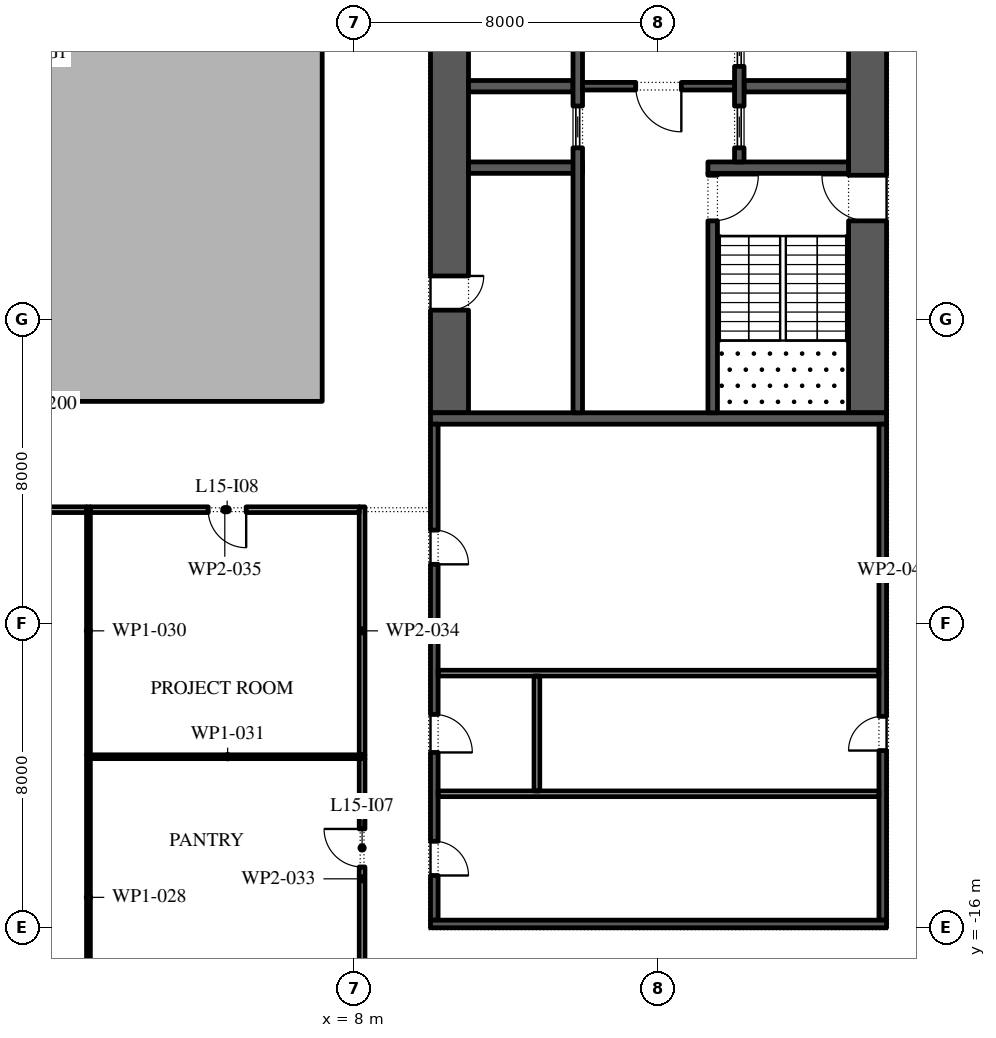
"""IFC4 building model, lengths in metres.
Left out: names, types, materials, properties, quantities, classifications, styles, units other than length and angle.
Written with IfcOpenShell. Run it as: python <this file> out.ifc"""

import sys

from ifc_helpers import new_model, si_unit, direction, frame, frame_2d, origin, place, context, subcontext, project, spatial, polyline, rectangle, outline, extrude, element, fill, save


model = new_model("IFC4")
c1 = context("Model", 3, precision=1e-05, world=origin(), true_north=direction((0.0, 1.0)))
c2 = subcontext(c1, "Body", "Model", "MODEL_VIEW")
j1 = project(units=[si_unit("LENGTHUNIT", "METRE"), si_unit("PLANEANGLEUNIT", "RADIAN")], contexts=[c1])
p1 = place(None, origin())
s1 = spatial("IfcSite", under=j1, at=p1, CompositionType="ELEMENT")
p2 = place(p1, origin())
s2 = spatial("IfcBuilding", under=s1, at=p2, CompositionType="ELEMENT")
p3 = place(p2, frame((0.0, 0.0, 73.2)))
s3 = spatial("IfcBuildingStorey", under=s2, at=p3, CompositionType="ELEMENT", Elevation=73.2)
p4 = place(p3, origin())
e1 = element("IfcWall", 1, at=p4, inside=s3, PredefinedType="STANDARD", context=c2, shape_type="SweptSolid", body=[
    extrude(outline(polyline([(-7.15, -2.15), (7.15, -2.15), (7.15, 16.15), (-7.15, 16.15), (-7.15, -2.15)]), holes=[polyline([(-7.0, -2.0), (-7.0, 16.0), (7.0, 16.0), (7.0, -2.0), (-7.0, -2.0)])]), origin(), (0.0, 0.0, 1.0), 4.0),
])
p5 = place(p3, frame((21.5, -2.45, 0.0), z_axis=(0.0, 0.0, 1.0), x_axis=(0.0, 1.0, 0.0)))
e2 = element("IfcWall", 2, at=p5, inside=s3, PredefinedType="SHEAR", context=c2, shape_type="SweptSolid", body=[
    extrude(rectangle(XDim=27.9, YDim=1.0, at=frame_2d((13.95, 0.0))), origin(), (0.0, 0.0, 1.0), 4.0),
])
p6 = place(p5, frame((5.05, 0.0, 0.0)))
e3 = element("IfcOpeningElement", 3, at=p6, cuts=e2, PredefinedType="OPENING", context=c2, shape_type="SweptSolid", body=[
    extrude(rectangle(XDim=1.2, YDim=2.1, at=frame_2d((0.6, 1.05))), frame((0.0, 0.51, 0.0), z_axis=(0.0, -1.0, 0.0), x_axis=(1.0, 0.0, 0.0)), (0.0, 0.0, 1.0), 1.02),
])
p7 = place(p5, frame((21.65, 0.0, 0.0)))
e4 = element("IfcOpeningElement", 4, at=p7, cuts=e2, PredefinedType="OPENING", context=c2, shape_type="SweptSolid", body=[
    extrude(rectangle(XDim=1.2, YDim=2.1, at=frame_2d((0.6, 1.05))), frame((0.0, 0.51, 0.0), z_axis=(0.0, -1.0, 0.0), x_axis=(1.0, 0.0, 0.0)), (0.0, 0.0, 1.0), 1.02),
])
p8 = place(p3, frame((10.5, -2.45, 0.0), z_axis=(0.0, 0.0, 1.0), x_axis=(0.0, 1.0, 0.0)))
e5 = element("IfcWall", 5, at=p8, inside=s3, PredefinedType="SHEAR", context=c2, shape_type="SweptSolid", body=[
    extrude(rectangle(XDim=27.9, YDim=1.0, at=frame_2d((13.95, 0.0))), origin(), (0.0, 0.0, 1.0), 4.0),
])
p9 = place(p8, frame((23.65, 0.0, 0.0)))
e6 = element("IfcOpeningElement", 6, at=p9, cuts=e5, PredefinedType="OPENING", context=c2, shape_type="SweptSolid", body=[
    extrude(rectangle(XDim=2.4, YDim=2.1, at=frame_2d((1.2, 1.05))), frame((0.0, 0.51, 0.0), z_axis=(0.0, -1.0, 0.0), x_axis=(1.0, 0.0, 0.0)), (0.0, 0.0, 1.0), 1.02),
])
p10 = place(p8, frame((2.7, 0.0, 0.0)))
e7 = element("IfcOpeningElement", 7, at=p10, cuts=e5, PredefinedType="OPENING", context=c2, shape_type="SweptSolid", body=[
    extrude(rectangle(XDim=0.9, YDim=2.1, at=frame_2d((0.45, 1.05))), frame((0.0, 0.51, 0.0), z_axis=(0.0, -1.0, 0.0), x_axis=(1.0, 0.0, 0.0)), (0.0, 0.0, 1.0), 1.02),
])
p11 = place(p3, frame((10.0, -2.6, 0.0), z_axis=(0.0, 0.0, 1.0), x_axis=(1.0, 0.0, 0.0)))
e8 = element("IfcWall", 8, at=p11, inside=s3, PredefinedType="SHEAR", context=c2, shape_type="SweptSolid", body=[
    extrude(rectangle(XDim=12.0, YDim=0.3, at=frame_2d((6.0, 0.0))), origin(), (0.0, 0.0, 1.0), 4.0),
])
p12 = place(p3, frame((17.3, 4.0, 0.0), z_axis=(0.0, 0.0, 1.0), x_axis=(1.0, 0.0, 0.0)))
e9 = element("IfcWall", 9, at=p12, inside=s3, PredefinedType="SHEAR", context=c2, shape_type="SweptSolid", body=[
    extrude(rectangle(XDim=3.7, YDim=0.3, at=frame_2d((1.85, 0.0))), origin(), (0.0, 0.0, 1.0), 4.0),
])
p13 = place(p3, frame((17.425, -2.45, 0.0), z_axis=(0.0, 0.0, 1.0), x_axis=(0.0, 1.0, 0.0)))
e10 = element("IfcWall", 10, at=p13, inside=s3, PredefinedType="SHEAR", context=c2, shape_type="SweptSolid", body=[
    extrude(rectangle(XDim=6.3, YDim=0.25, at=frame_2d((3.15, 0.0))), origin(), (0.0, 0.0, 1.0), 4.0),
])
p14 = place(p13, frame((5.05, 0.0, 0.0)))
e11 = element("IfcOpeningElement", 11, at=p14, cuts=e10, PredefinedType="OPENING", context=c2, shape_type="SweptSolid", body=[
    extrude(rectangle(XDim=1.2, YDim=2.1, at=frame_2d((0.6, 1.05))), frame((0.0, 0.135, 0.0), z_axis=(0.0, -1.0, 0.0), x_axis=(1.0, 0.0, 0.0)), (0.0, 0.0, 1.0), 0.27),
])
p15 = place(p3, frame((18.25, 6.143, 0.0), z_axis=(0.0, 0.0, 1.0), x_axis=(1.0, 0.0, 0.0)))
e12 = element("IfcWall", 12, at=p15, inside=s3, PredefinedType="SHEAR", context=c2, shape_type="SweptSolid", body=[
    extrude(rectangle(XDim=2.75, YDim=0.3, at=frame_2d((1.375, 0.0))), origin(), (0.0, 0.0, 1.0), 4.0),
])
p16 = place(p3, frame((18.125, 4.15, 0.0), z_axis=(0.0, 0.0, 1.0), x_axis=(0.0, 1.0, 0.0)))
e13 = element("IfcWall", 13, at=p16, inside=s3, PredefinedType="SHEAR", context=c2, shape_type="SweptSolid", body=[
    extrude(rectangle(XDim=14.7, YDim=0.25, at=frame_2d((7.35, 0.0))), origin(), (0.0, 0.0, 1.0), 4.0),
])
p17 = place(p16, frame((0.371, 0.0, 0.0)))
e14 = element("IfcOpeningElement", 14, at=p17, cuts=e13, PredefinedType="OPENING", context=c2, shape_type="SweptSolid", body=[
    extrude(rectangle(XDim=1.1, YDim=2.1, at=frame_2d((0.55, 1.05))), frame((0.0, 0.135, 0.0), z_axis=(0.0, -1.0, 0.0), x_axis=(1.0, 0.0, 0.0)), (0.0, 0.0, 1.0), 0.27),
])
p18 = place(p16, frame((2.514, 0.0, 0.0)))
e15 = element("IfcOpeningElement", 15, at=p18, cuts=e13, PredefinedType="OPENING", context=c2, shape_type="SweptSolid", body=[
    extrude(rectangle(XDim=1.1, YDim=2.1, at=frame_2d((0.55, 1.05))), frame((0.0, 0.135, 0.0), z_axis=(0.0, -1.0, 0.0), x_axis=(1.0, 0.0, 0.0)), (0.0, 0.0, 1.0), 0.27),
])
p19 = place(p16, frame((4.657, 0.0, 0.0)))
e16 = element("IfcOpeningElement", 16, at=p19, cuts=e13, PredefinedType="OPENING", context=c2, shape_type="SweptSolid", body=[
    extrude(rectangle(XDim=1.1, YDim=2.1, at=frame_2d((0.55, 1.05))), frame((0.0, 0.135, 0.0), z_axis=(0.0, -1.0, 0.0), x_axis=(1.0, 0.0, 0.0)), (0.0, 0.0, 1.0), 0.27),
])
p20 = place(p16, frame((6.8, 0.0, 0.0)))
e17 = element("IfcOpeningElement", 17, at=p20, cuts=e13, PredefinedType="OPENING", context=c2, shape_type="SweptSolid", body=[
    extrude(rectangle(XDim=1.1, YDim=2.1, at=frame_2d((0.55, 1.05))), frame((0.0, 0.135, 0.0), z_axis=(0.0, -1.0, 0.0), x_axis=(1.0, 0.0, 0.0)), (0.0, 0.0, 1.0), 0.27),
])
p21 = place(p16, frame((8.943, 0.0, 0.0)))
e18 = element("IfcOpeningElement", 18, at=p21, cuts=e13, PredefinedType="OPENING", context=c2, shape_type="SweptSolid", body=[
    extrude(rectangle(XDim=1.1, YDim=2.1, at=frame_2d((0.55, 1.05))), frame((0.0, 0.135, 0.0), z_axis=(0.0, -1.0, 0.0), x_axis=(1.0, 0.0, 0.0)), (0.0, 0.0, 1.0), 0.27),
])
p22 = place(p16, frame((11.086, 0.0, 0.0)))
e19 = element("IfcOpeningElement", 19, at=p22, cuts=e13, PredefinedType="OPENING", context=c2, shape_type="SweptSolid", body=[
    extrude(rectangle(XDim=1.1, YDim=2.1, at=frame_2d((0.55, 1.05))), frame((0.0, 0.135, 0.0), z_axis=(0.0, -1.0, 0.0), x_axis=(1.0, 0.0, 0.0)), (0.0, 0.0, 1.0), 0.27),
])
p23 = place(p16, frame((13.229, 0.0, 0.0)))
e20 = element("IfcOpeningElement", 20, at=p23, cuts=e13, PredefinedType="OPENING", context=c2, shape_type="SweptSolid", body=[
    extrude(rectangle(XDim=1.1, YDim=2.1, at=frame_2d((0.55, 1.05))), frame((0.0, 0.135, 0.0), z_axis=(0.0, -1.0, 0.0), x_axis=(1.0, 0.0, 0.0)), (0.0, 0.0, 1.0), 0.27),
])
p24 = place(p3, frame((11.0, 4.0, 0.0), z_axis=(0.0, 0.0, 1.0), x_axis=(1.0, 0.0, 0.0)))
e21 = element("IfcWall", 21, at=p24, inside=s3, PredefinedType="SHEAR", context=c2, shape_type="SweptSolid", body=[
    extrude(rectangle(XDim=3.0, YDim=0.3, at=frame_2d((1.5, 0.0))), origin(), (0.0, 0.0, 1.0), 4.0),
])
p25 = place(p3, frame((11.0, 6.143, 0.0), z_axis=(0.0, 0.0, 1.0), x_axis=(1.0, 0.0, 0.0)))
e22 = element("IfcWall", 22, at=p25, inside=s3, PredefinedType="SHEAR", context=c2, shape_type="SweptSolid", body=[
    extrude(rectangle(XDim=2.75, YDim=0.3, at=frame_2d((1.375, 0.0))), origin(), (0.0, 0.0, 1.0), 4.0),
])
p26 = place(p3, frame((13.875, -2.45, 0.0), z_axis=(0.0, 0.0, 1.0), x_axis=(0.0, 1.0, 0.0)))
e23 = element("IfcWall", 23, at=p26, inside=s3, PredefinedType="SHEAR", context=c2, shape_type="SweptSolid", body=[
    extrude(rectangle(XDim=21.3, YDim=0.25, at=frame_2d((10.65, 0.0))), origin(), (0.0, 0.0, 1.0), 4.0),
])
p27 = place(p26, frame((10.196, 0.0, 0.0)))
e24 = element("IfcOpeningElement", 24, at=p27, cuts=e23, PredefinedType="OPENING", context=c2, shape_type="SweptSolid", body=[
    extrude(rectangle(XDim=0.9, YDim=2.1, at=frame_2d((0.45, 1.05))), frame((0.0, 0.135, 0.0), z_axis=(0.0, -1.0, 0.0), x_axis=(1.0, 0.0, 0.0)), (0.0, 0.0, 1.0), 0.27),
])
p28 = place(p26, frame((16.475, 0.0, 0.0)))
e25 = element("IfcOpeningElement", 25, at=p28, cuts=e23, PredefinedType="OPENING", context=c2, shape_type="SweptSolid", body=[
    extrude(rectangle(XDim=0.9, YDim=2.1, at=frame_2d((0.45, 1.05))), frame((0.0, 0.135, 0.0), z_axis=(0.0, -1.0, 0.0), x_axis=(1.0, 0.0, 0.0)), (0.0, 0.0, 1.0), 0.27),
])
p29 = place(p26, frame((6.971, 0.0, 0.0)))
e26 = element("IfcOpeningElement", 26, at=p29, cuts=e23, PredefinedType="OPENING", context=c2, shape_type="SweptSolid", body=[
    extrude(rectangle(XDim=1.1, YDim=2.1, at=frame_2d((0.55, 1.05))), frame((0.0, 0.135, 0.0), z_axis=(0.0, -1.0, 0.0), x_axis=(1.0, 0.0, 0.0)), (0.0, 0.0, 1.0), 0.27),
])
p30 = place(p3, frame((14.0, 6.143, 0.0), z_axis=(0.0, 0.0, 1.0), x_axis=(1.0, 0.0, 0.0)))
e27 = element("IfcWall", 27, at=p30, inside=s3, PredefinedType="SHEAR", context=c2, shape_type="SweptSolid", body=[
    extrude(rectangle(XDim=4.0, YDim=0.2, at=frame_2d((2.0, 0.0))), origin(), (0.0, 0.0, 1.0), 4.0),
])
p31 = place(p30, frame((1.4, 0.0, 0.0)))
e28 = element("IfcOpeningElement", 28, at=p31, cuts=e27, PredefinedType="OPENING", context=c2, shape_type="SweptSolid", body=[
    extrude(rectangle(XDim=1.2, YDim=2.1, at=frame_2d((0.6, 1.05))), frame((0.0, 0.11, 0.0), z_axis=(0.0, -1.0, 0.0), x_axis=(1.0, 0.0, 0.0)), (0.0, 0.0, 1.0), 0.22),
])
p32 = place(p3, frame((21.9, -15.8, 0.0), z_axis=(0.0, 0.0, 1.0), x_axis=(0.0, 1.0, 0.0)))
e29 = element("IfcWall", 29, at=p32, inside=s3, PredefinedType="SHEAR", context=c2, shape_type="SweptSolid", body=[
    extrude(rectangle(XDim=13.05, YDim=0.2, at=frame_2d((6.525, 0.0))), origin(), (0.0, 0.0, 1.0), 4.0),
])
p33 = place(p32, frame((4.462, 0.0, 0.0)))
e30 = element("IfcOpeningElement", 30, at=p33, cuts=e29, PredefinedType="OPENING", context=c2, shape_type="SweptSolid", body=[
    extrude(rectangle(XDim=0.9, YDim=2.1, at=frame_2d((0.45, 1.05))), frame((0.0, 0.11, 0.0), z_axis=(0.0, -1.0, 0.0), x_axis=(1.0, 0.0, 0.0)), (0.0, 0.0, 1.0), 0.22),
])
p34 = place(p3, frame((10.1, -15.8, 0.0), z_axis=(0.0, 0.0, 1.0), x_axis=(0.0, 1.0, 0.0)))
e31 = element("IfcWall", 31, at=p34, inside=s3, PredefinedType="SHEAR", context=c2, shape_type="SweptSolid", body=[
    extrude(rectangle(XDim=13.05, YDim=0.2, at=frame_2d((6.525, 0.0))), origin(), (0.0, 0.0, 1.0), 4.0),
])
p35 = place(p34, frame((1.175, 0.0, 0.0)))
e32 = element("IfcOpeningElement", 32, at=p35, cuts=e31, PredefinedType="OPENING", context=c2, shape_type="SweptSolid", body=[
    extrude(rectangle(XDim=0.9, YDim=2.1, at=frame_2d((0.45, 1.05))), frame((0.0, 0.11, 0.0), z_axis=(0.0, -1.0, 0.0), x_axis=(1.0, 0.0, 0.0)), (0.0, 0.0, 1.0), 0.22),
])
p36 = place(p34, frame((4.413, 0.0, 0.0)))
e33 = element("IfcOpeningElement", 33, at=p36, cuts=e31, PredefinedType="OPENING", context=c2, shape_type="SweptSolid", body=[
    extrude(rectangle(XDim=1.0, YDim=2.1, at=frame_2d((0.5, 1.05))), frame((0.0, 0.11, 0.0), z_axis=(0.0, -1.0, 0.0), x_axis=(1.0, 0.0, 0.0)), (0.0, 0.0, 1.0), 0.22),
])
p37 = place(p34, frame((9.363, 0.0, 0.0)))
e34 = element("IfcOpeningElement", 34, at=p37, cuts=e31, PredefinedType="OPENING", context=c2, shape_type="SweptSolid", body=[
    extrude(rectangle(XDim=0.9, YDim=2.1, at=frame_2d((0.45, 1.05))), frame((0.0, 0.11, 0.0), z_axis=(0.0, -1.0, 0.0), x_axis=(1.0, 0.0, 0.0)), (0.0, 0.0, 1.0), 0.22),
])
p38 = place(p3, frame((10.0, -15.9, 0.0), z_axis=(0.0, 0.0, 1.0), x_axis=(1.0, 0.0, 0.0)))
e35 = element("IfcWall", 35, at=p38, inside=s3, PredefinedType="SHEAR", context=c2, shape_type="SweptSolid", body=[
    extrude(rectangle(XDim=12.0, YDim=0.2, at=frame_2d((6.0, 0.0))), origin(), (0.0, 0.0, 1.0), 4.0),
])
for number, where, z_axis, x_axis in (
    (36, (10.2, -9.3, 0.0), (0.0, 0.0, 1.0), (1.0, 0.0, 0.0)),
    (37, (10.2, -12.475, 0.0), (0.0, 0.0, 1.0), (1.0, 0.0, 0.0)),
):
    element("IfcWall", number, at=place(p3, frame(where, z_axis=z_axis, x_axis=x_axis)), inside=s3, PredefinedType="PARTITIONING", context=c2, shape_type="SweptSolid", body=[
        extrude(rectangle(XDim=11.6, YDim=0.15, at=frame_2d((5.8, 0.0))), origin(), (0.0, 0.0, 1.0), 4.0),
    ])
p39 = place(p3, frame((12.8, -12.4, 0.0), z_axis=(0.0, 0.0, 1.0), x_axis=(0.0, 1.0, 0.0)))
e38 = element("IfcWall", 38, at=p39, inside=s3, PredefinedType="PARTITIONING", context=c2, shape_type="SweptSolid", body=[
    extrude(rectangle(XDim=3.025, YDim=0.15, at=frame_2d((1.512, 0.0))), origin(), (0.0, 0.0, 1.0), 4.0),
])
p40 = place(p3, frame((1.0, -18.95, 0.0), z_axis=(0.0, 0.0, 1.0), x_axis=(0.0, 1.0, 0.0)))
e39 = element("IfcWall", 39, at=p40, inside=s3, PredefinedType="PARTITIONING", context=c2, shape_type="SweptSolid", body=[
    extrude(rectangle(XDim=7.5, YDim=0.1, at=frame_2d((3.75, 0.0))), origin(), (0.0, 0.0, 1.0), 4.0),
])
p41 = place(p3, frame((1.0, -11.45, 0.0), z_axis=(0.0, 0.0, 1.0), x_axis=(0.0, 1.0, 0.0)))
e40 = element("IfcWall", 40, at=p41, inside=s3, PredefinedType="PARTITIONING", context=c2, shape_type="SweptSolid", body=[
    extrude(rectangle(XDim=6.525, YDim=0.1, at=frame_2d((3.262, 0.0))), origin(), (0.0, 0.0, 1.0), 4.0),
])
p42 = place(p3, frame((1.05, -11.5, 0.0), z_axis=(0.0, 0.0, 1.0), x_axis=(1.0, 0.0, 0.0)))
e41 = element("IfcWall", 41, at=p42, inside=s3, PredefinedType="PARTITIONING", context=c2, shape_type="SweptSolid", body=[
    extrude(rectangle(XDim=7.225, YDim=0.1, at=frame_2d((3.612, 0.0))), origin(), (0.0, 0.0, 1.0), 4.0),
])
p43 = place(p3, frame((0.95, -5.0, 0.0), z_axis=(0.0, 0.0, 1.0), x_axis=(-1.0, 0.0, 0.0)))
e42 = element("IfcWall", 42, at=p43, inside=s3, PredefinedType="PARTITIONING", context=c2, shape_type="SweptSolid", body=[
    extrude(rectangle(XDim=9.075, YDim=0.15, at=frame_2d((4.538, 0.0))), origin(), (0.0, 0.0, 1.0), 4.0),
])
p44 = place(p3, frame((8.2, -17.875, 0.0), z_axis=(0.0, 0.0, 1.0), x_axis=(0.0, 1.0, 0.0)))
e43 = element("IfcWall", 43, at=p44, inside=s3, PredefinedType="PARTITIONING", context=c2, shape_type="SweptSolid", body=[
    extrude(rectangle(XDim=6.325, YDim=0.15, at=frame_2d((3.163, 0.0))), origin(), (0.0, 0.0, 1.0), 4.0),
])
p45 = place(p44, frame((3.475, 0.0, 0.0)))
e44 = element("IfcOpeningElement", 44, at=p45, cuts=e43, PredefinedType="OPENING", context=c2, shape_type="SweptSolid", body=[
    extrude(rectangle(XDim=1.0, YDim=2.1, at=frame_2d((0.5, 1.05))), frame((0.0, 0.085, 0.0), z_axis=(0.0, -1.0, 0.0), x_axis=(1.0, 0.0, 0.0)), (0.0, 0.0, 1.0), 0.17),
])
p46 = place(p3, frame((8.2, -11.45, 0.0), z_axis=(0.0, 0.0, 1.0), x_axis=(0.0, 1.0, 0.0)))
e45 = element("IfcWall", 45, at=p46, inside=s3, PredefinedType="PARTITIONING", context=c2, shape_type="SweptSolid", body=[
    extrude(rectangle(XDim=6.525, YDim=0.15, at=frame_2d((3.262, 0.0))), origin(), (0.0, 0.0, 1.0), 4.0),
])
p47 = place(p3, frame((8.125, -5.0, 0.0), z_axis=(0.0, 0.0, 1.0), x_axis=(-1.0, 0.0, 0.0)))
e46 = element("IfcWall", 46, at=p47, inside=s3, PredefinedType="PARTITIONING", context=c2, shape_type="SweptSolid", body=[
    extrude(rectangle(XDim=7.075, YDim=0.15, at=frame_2d((3.538, 0.0))), origin(), (0.0, 0.0, 1.0), 4.0),
])
p48 = place(p47, frame((2.975, 0.0, 0.0)))
e47 = element("IfcOpeningElement", 47, at=p48, cuts=e46, PredefinedType="OPENING", context=c2, shape_type="SweptSolid", body=[
    extrude(rectangle(XDim=1.0, YDim=2.1, at=frame_2d((0.5, 1.05))), frame((0.0, 0.085, 0.0), z_axis=(0.0, -1.0, 0.0), x_axis=(1.0, 0.0, 0.0)), (0.0, 0.0, 1.0), 0.17),
])
p49 = place(p17, origin())
e48 = element("IfcDoor", 48, at=p49, inside=s3, OperationType="SLIDING_TO_LEFT", PredefinedType="DOOR", context=c2, shape_type="SweptSolid", body=[
    extrude(rectangle(XDim=1.1, YDim=2.1, at=frame_2d((0.55, 1.05))), frame((0.0, 0.025, 0.0), z_axis=(0.0, -1.0, 0.0), x_axis=(1.0, 0.0, 0.0)), (0.0, 0.0, 1.0), 0.05),
])
fill(e14, e48)
p50 = place(p18, origin())
e49 = element("IfcDoor", 49, at=p50, inside=s3, OperationType="SLIDING_TO_LEFT", PredefinedType="DOOR", context=c2, shape_type="SweptSolid", body=[
    extrude(rectangle(XDim=1.1, YDim=2.1, at=frame_2d((0.55, 1.05))), frame((0.0, 0.025, 0.0), z_axis=(0.0, -1.0, 0.0), x_axis=(1.0, 0.0, 0.0)), (0.0, 0.0, 1.0), 0.05),
])
fill(e15, e49)
p51 = place(p29, origin())
e50 = element("IfcDoor", 50, at=p51, inside=s3, OperationType="SLIDING_TO_LEFT", PredefinedType="DOOR", context=c2, shape_type="SweptSolid", body=[
    extrude(rectangle(XDim=1.1, YDim=2.1, at=frame_2d((0.55, 1.05))), frame((0.0, 0.025, 0.0), z_axis=(0.0, -1.0, 0.0), x_axis=(1.0, 0.0, 0.0)), (0.0, 0.0, 1.0), 0.05),
])
fill(e26, e50)
p52 = place(p31, frame((1.2, 0.0, 0.0), z_axis=(0.0, 0.0, 1.0), x_axis=(-1.0, 0.0, 0.0)))
e51 = element("IfcDoor", 51, at=p52, inside=s3, OperationType="SINGLE_SWING_RIGHT", PredefinedType="DOOR", context=c2, shape_type="SweptSolid", body=[
    extrude(rectangle(XDim=1.2, YDim=2.1, at=frame_2d((0.6, 1.05))), frame((0.0, 0.025, 0.0), z_axis=(0.0, -1.0, 0.0), x_axis=(1.0, 0.0, 0.0)), (0.0, 0.0, 1.0), 0.05),
])
fill(e28, e51)
p53 = place(p14, frame((1.2, 0.0, 0.0), z_axis=(0.0, 0.0, 1.0), x_axis=(-1.0, 0.0, 0.0)))
e52 = element("IfcDoor", 52, at=p53, inside=s3, OperationType="SINGLE_SWING_RIGHT", PredefinedType="DOOR", context=c2, shape_type="SweptSolid", body=[
    extrude(rectangle(XDim=1.2, YDim=2.1, at=frame_2d((0.6, 1.05))), frame((0.0, 0.025, 0.0), z_axis=(0.0, -1.0, 0.0), x_axis=(1.0, 0.0, 0.0)), (0.0, 0.0, 1.0), 0.05),
])
fill(e11, e52)
p54 = place(p6, origin())
e53 = element("IfcDoor", 53, at=p54, inside=s3, OperationType="SINGLE_SWING_LEFT", PredefinedType="DOOR", context=c2, shape_type="SweptSolid", body=[
    extrude(rectangle(XDim=1.2, YDim=2.1, at=frame_2d((0.6, 1.05))), frame((0.0, 0.025, 0.0), z_axis=(0.0, -1.0, 0.0), x_axis=(1.0, 0.0, 0.0)), (0.0, 0.0, 1.0), 0.05),
])
fill(e3, e53)
p55 = place(p10, frame((0.9, -0.95, 0.0), z_axis=(0.0, 0.0, 1.0), x_axis=(-1.0, 0.0, 0.0)))
e54 = element("IfcDoor", 54, at=p55, inside=s3, OperationType="SINGLE_SWING_RIGHT", PredefinedType="DOOR", context=c2, shape_type="SweptSolid", body=[
    extrude(rectangle(XDim=0.9, YDim=2.1, at=frame_2d((0.45, 1.05))), frame((0.0, -0.45, 0.0), z_axis=(0.0, -1.0, 0.0), x_axis=(1.0, 0.0, 0.0)), (0.0, 0.0, 1.0), 0.05),
])
fill(e7, e54)
p56 = place(p35, frame((0.9, -0.15, 0.0), z_axis=(0.0, 0.0, 1.0), x_axis=(-1.0, 0.0, 0.0)))
e55 = element("IfcDoor", 55, at=p56, inside=s3, OperationType="SINGLE_SWING_LEFT", PredefinedType="DOOR", context=c2, shape_type="SweptSolid", body=[
    extrude(rectangle(XDim=0.9, YDim=2.1, at=frame_2d((0.45, 1.05))), frame((0.0, -0.05, 0.0), z_axis=(0.0, -1.0, 0.0), x_axis=(1.0, 0.0, 0.0)), (0.0, 0.0, 1.0), 0.05),
])
fill(e32, e55)
p57 = place(p36, frame((1.0, -0.15, 0.0), z_axis=(0.0, 0.0, 1.0), x_axis=(-1.0, 0.0, 0.0)))
e56 = element("IfcDoor", 56, at=p57, inside=s3, OperationType="SINGLE_SWING_LEFT", PredefinedType="DOOR", context=c2, shape_type="SweptSolid", body=[
    extrude(rectangle(XDim=1.0, YDim=2.1, at=frame_2d((0.5, 1.05))), frame((0.0, -0.05, 0.0), z_axis=(0.0, -1.0, 0.0), x_axis=(1.0, 0.0, 0.0)), (0.0, 0.0, 1.0), 0.05),
])
fill(e33, e56)
p58 = place(p33, origin())
e57 = element("IfcDoor", 57, at=p58, inside=s3, OperationType="SINGLE_SWING_RIGHT", PredefinedType="DOOR", context=c2, shape_type="SweptSolid", body=[
    extrude(rectangle(XDim=0.9, YDim=2.1, at=frame_2d((0.45, 1.05))), frame((0.0, 0.1, 0.0), z_axis=(0.0, -1.0, 0.0), x_axis=(1.0, 0.0, 0.0)), (0.0, 0.0, 1.0), 0.05),
])
fill(e30, e57)
p59 = place(p37, frame((0.9, -0.15, 0.0), z_axis=(0.0, 0.0, 1.0), x_axis=(-1.0, 0.0, 0.0)))
e58 = element("IfcDoor", 58, at=p59, inside=s3, OperationType="SINGLE_SWING_LEFT", PredefinedType="DOOR", context=c2, shape_type="SweptSolid", body=[
    extrude(rectangle(XDim=0.9, YDim=2.1, at=frame_2d((0.45, 1.05))), frame((0.0, -0.05, 0.0), z_axis=(0.0, -1.0, 0.0), x_axis=(1.0, 0.0, 0.0)), (0.0, 0.0, 1.0), 0.05),
])
fill(e34, e58)
p60 = place(p45, origin())
e59 = element("IfcDoor", 59, at=p60, inside=s3, OperationType="SINGLE_SWING_LEFT", PredefinedType="DOOR", context=c2, shape_type="SweptSolid", body=[
    extrude(rectangle(XDim=1.0, YDim=2.1, at=frame_2d((0.5, 1.05))), frame((0.0, 0.025, 0.0), z_axis=(0.0, -1.0, 0.0), x_axis=(1.0, 0.0, 0.0)), (0.0, 0.0, 1.0), 0.05),
])
fill(e44, e59)
p61 = place(p48, origin())
e60 = element("IfcDoor", 60, at=p61, inside=s3, OperationType="SINGLE_SWING_RIGHT", PredefinedType="DOOR", context=c2, shape_type="SweptSolid", body=[
    extrude(rectangle(XDim=1.0, YDim=2.1, at=frame_2d((0.5, 1.05))), frame((0.0, 0.025, 0.0), z_axis=(0.0, -1.0, 0.0), x_axis=(1.0, 0.0, 0.0)), (0.0, 0.0, 1.0), 0.05),
])
fill(e47, e60)
save(model, sys.argv[1])
